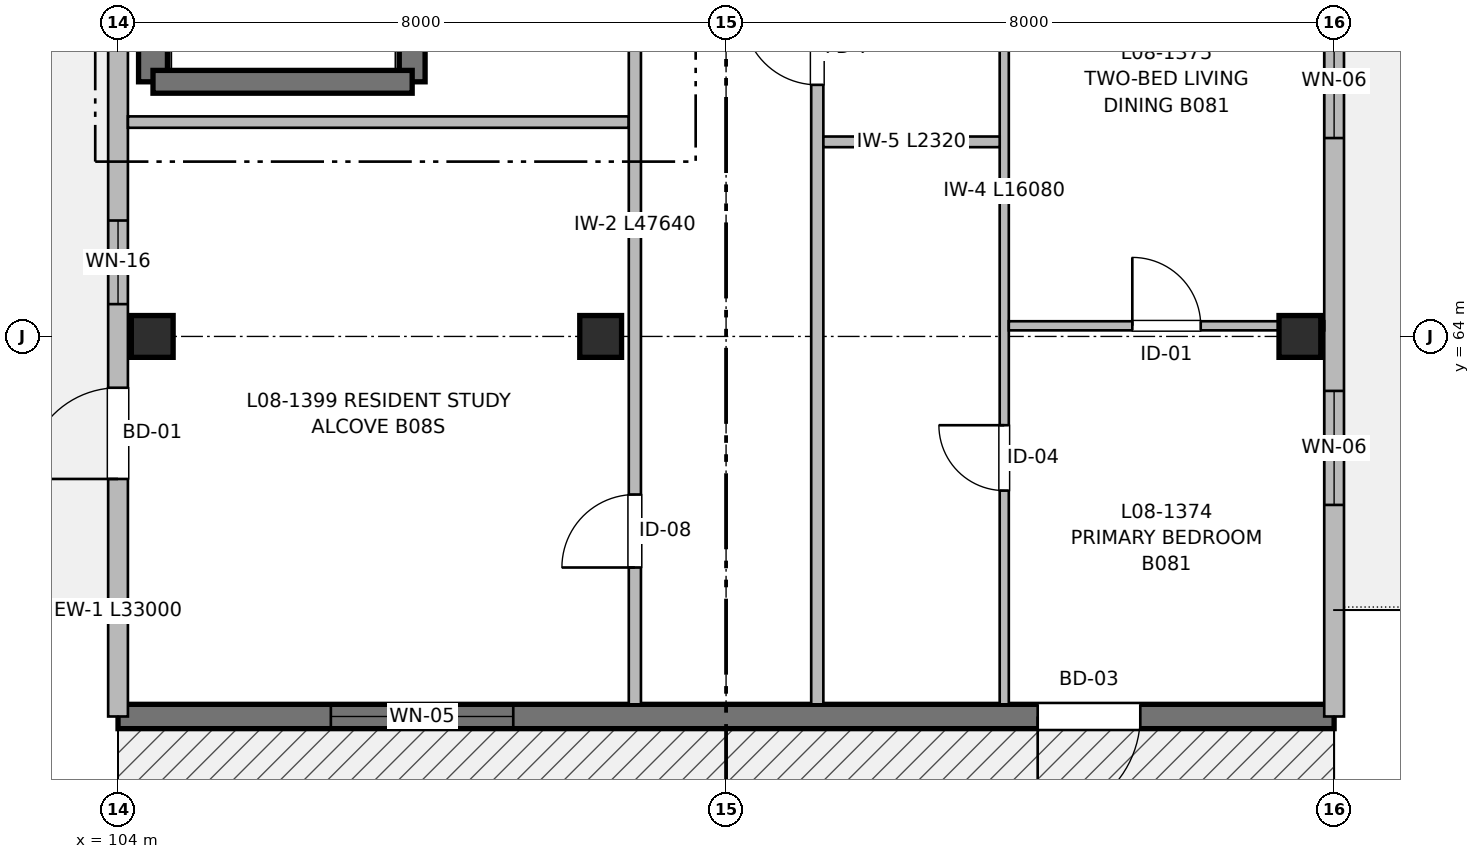
"""IFC4 building model, lengths in metres.
Left out: names, types, materials, properties, quantities, classifications, styles, units other than length and angle.
Written with IfcOpenShell. Run it as: python <this file> out.ifc"""

import sys

from ifc_helpers import new_model, si_unit, direction, frame, frame_2d, origin, origin_2d, place, context, subcontext, project, spatial, rectangle, extrude, element, fill, save


model = new_model("IFC4")
c1 = context("Model", 3, precision=1e-05, world=origin(), true_north=direction((0.0, 1.0)))
c2 = subcontext(c1, "Body", "Model", "MODEL_VIEW")
j1 = project(units=[si_unit("LENGTHUNIT", "METRE"), si_unit("PLANEANGLEUNIT", "RADIAN")], contexts=[c1])
p1 = place(None, origin())
s1 = spatial("IfcSite", under=j1, at=p1, CompositionType="ELEMENT")
p2 = place(p1, origin())
s2 = spatial("IfcBuilding", under=s1, at=p2, CompositionType="ELEMENT")
p3 = place(p2, frame((0.0, 0.0, 26.56)))
s3 = spatial("IfcBuildingStorey", under=s2, at=p3, CompositionType="ELEMENT", Elevation=26.56)
for number, where, z_axis, x_axis in (
    (1, (104.45, 64.0, 0.0), (0.0, 0.0, 1.0), (1.0, 0.0, 0.0)),
    (2, (110.35, 64.0, 0.0), (0.0, 0.0, 1.0), (1.0, 0.0, 0.0)),
    (3, (119.55, 64.0, 0.0), (0.0, 0.0, 1.0), (1.0, 0.0, 0.0)),
):
    element("IfcColumn", number, at=place(p3, frame(where, z_axis=z_axis, x_axis=x_axis)), inside=s3, PredefinedType="COLUMN", context=c2, shape_type="SweptSolid", body=[
        extrude(rectangle(XDim=0.55, YDim=0.55, at=origin_2d()), origin(), (0.0, 0.0, 1.0), 3.2),
    ])
p4 = place(p3, frame((104.46, 67.35, 0.0), z_axis=(0.0, 0.0, 1.0), x_axis=(0.0, 1.0, 0.0)))
e4 = element("IfcWall", 4, at=p4, inside=s3, PredefinedType="SHEAR", context=c2, shape_type="SweptSolid", body=[
    extrude(rectangle(XDim=12.45, YDim=0.38, at=frame_2d((6.225, 0.0))), origin(), (0.0, 0.0, 1.0), 3.2),
])
p5 = place(p4, frame((2.2, 0.0, 0.97)))
e5 = element("IfcOpeningElement", 5, at=p5, cuts=e4, PredefinedType="OPENING", context=c2, shape_type="SweptSolid", body=[
    extrude(rectangle(XDim=0.95, YDim=1.25, at=frame_2d((0.475, 0.625))), frame((0.0, 0.2, 0.0), z_axis=(0.0, -1.0, 0.0), x_axis=(1.0, 0.0, 0.0)), (0.0, 0.0, 1.0), 0.4),
])
p6 = place(p3, frame((107.87, 79.8, 0.0), z_axis=(0.0, 0.0, 1.0), x_axis=(0.0, -1.0, 0.0)))
e6 = element("IfcWall", 6, at=p6, inside=s3, PredefinedType="SHEAR", context=c2, shape_type="SweptSolid", body=[
    extrude(rectangle(XDim=12.45, YDim=0.34, at=frame_2d((6.225, 0.0))), origin(), (0.0, 0.0, 1.0), 3.2),
])
p7 = place(p6, frame((10.85, 0.0, 0.0)))
e7 = element("IfcOpeningElement", 7, at=p7, cuts=e6, PredefinedType="OPENING", context=c2, shape_type="SweptSolid", body=[
    extrude(rectangle(XDim=1.05, YDim=2.15, at=frame_2d((0.525, 1.075))), frame((0.0, 0.18, 0.0), z_axis=(0.0, -1.0, 0.0), x_axis=(1.0, 0.0, 0.0)), (0.0, 0.0, 1.0), 0.36),
])
p8 = place(p3, frame((107.87, 67.35, 0.0), z_axis=(0.0, 0.0, 1.0), x_axis=(-1.0, 0.0, 0.0)))
e8 = element("IfcWall", 8, at=p8, inside=s3, PredefinedType="SHEAR", context=c2, shape_type="SweptSolid", body=[
    extrude(rectangle(XDim=3.41, YDim=0.3, at=frame_2d((1.705, 0.0))), origin(), (0.0, 0.0, 1.0), 3.2),
])
p9 = place(p3, frame((120.0, 59.0, 0.0), z_axis=(0.0, 0.0, 1.0), x_axis=(-1.0, 0.0, 0.0)))
e9 = element("IfcWall", 9, at=p9, inside=s3, PredefinedType="SHEAR", context=c2, shape_type="SweptSolid", body=[
    extrude(rectangle(XDim=16.0, YDim=0.32, at=frame_2d((8.0, 0.0))), origin(), (0.0, 0.0, 1.0), 2.98),
])
p10 = place(p9, frame((2.55, 0.0, 0.0)))
e10 = element("IfcOpeningElement", 10, at=p10, cuts=e9, PredefinedType="OPENING", context=c2, shape_type="SweptSolid", body=[
    extrude(rectangle(XDim=1.35, YDim=2.2, at=frame_2d((0.675, 1.1))), frame((0.0, 0.17, 0.0), z_axis=(0.0, -1.0, 0.0), x_axis=(1.0, 0.0, 0.0)), (0.0, 0.0, 1.0), 0.34),
])
p11 = place(p9, frame((10.8, 0.0, 0.72)))
e11 = element("IfcOpeningElement", 11, at=p11, cuts=e9, PredefinedType="OPENING", context=c2, shape_type="SweptSolid", body=[
    extrude(rectangle(XDim=2.4, YDim=1.5, at=frame_2d((1.2, 0.75))), frame((0.0, 0.17, 0.0), z_axis=(0.0, -1.0, 0.0), x_axis=(1.0, 0.0, 0.0)), (0.0, 0.0, 1.0), 0.34),
])
p12 = place(p3, frame((120.0, 88.0, 0.0), z_axis=(0.0, 0.0, 1.0), x_axis=(0.0, -1.0, 0.0)))
e12 = element("IfcWall", 12, at=p12, inside=s3, PredefinedType="SOLIDWALL", context=c2, shape_type="SweptSolid", body=[
    extrude(rectangle(XDim=29.0, YDim=0.26, at=frame_2d((14.5, 0.0))), origin(), (0.0, 0.0, 1.0), 2.98),
])
p13 = place(p12, frame((4.233, 0.0, 0.0)))
e13 = element("IfcOpeningElement", 13, at=p13, cuts=e12, PredefinedType="OPENING", context=c2, shape_type="SweptSolid", body=[
    extrude(rectangle(XDim=1.2, YDim=2.2, at=frame_2d((0.6, 1.1))), frame((0.0, 0.14, 0.0), z_axis=(0.0, -1.0, 0.0), x_axis=(1.0, 0.0, 0.0)), (0.0, 0.0, 1.0), 0.28),
])
p14 = place(p12, frame((6.133, 0.0, 0.62)))
e14 = element("IfcOpeningElement", 14, at=p14, cuts=e12, PredefinedType="OPENING", context=c2, shape_type="SweptSolid", body=[
    extrude(rectangle(XDim=1.1, YDim=1.6, at=frame_2d((0.55, 0.8))), frame((0.0, 0.14, 0.0), z_axis=(0.0, -1.0, 0.0), x_axis=(1.0, 0.0, 0.0)), (0.0, 0.0, 1.0), 0.28),
])
p15 = place(p12, frame((13.3, 0.0, 0.72)))
e15 = element("IfcOpeningElement", 15, at=p15, cuts=e12, PredefinedType="OPENING", context=c2, shape_type="SweptSolid", body=[
    extrude(rectangle(XDim=2.4, YDim=1.5, at=frame_2d((1.2, 0.75))), frame((0.0, 0.14, 0.0), z_axis=(0.0, -1.0, 0.0), x_axis=(1.0, 0.0, 0.0)), (0.0, 0.0, 1.0), 0.28),
])
p16 = place(p12, frame((24.717, 0.0, 0.82)))
e16 = element("IfcOpeningElement", 16, at=p16, cuts=e12, PredefinedType="OPENING", context=c2, shape_type="SweptSolid", body=[
    extrude(rectangle(XDim=1.5, YDim=1.4, at=frame_2d((0.75, 0.7))), frame((0.0, 0.14, 0.0), z_axis=(0.0, -1.0, 0.0), x_axis=(1.0, 0.0, 0.0)), (0.0, 0.0, 1.0), 0.28),
])
p17 = place(p12, frame((19.89, 0.0, 0.82)))
e17 = element("IfcOpeningElement", 17, at=p17, cuts=e12, PredefinedType="OPENING", context=c2, shape_type="SweptSolid", body=[
    extrude(rectangle(XDim=1.5, YDim=1.4, at=frame_2d((0.75, 0.7))), frame((0.0, 0.14, 0.0), z_axis=(0.0, -1.0, 0.0), x_axis=(1.0, 0.0, 0.0)), (0.0, 0.0, 1.0), 0.28),
])
p18 = place(p12, frame((9.375, 0.0, 0.82)))
e18 = element("IfcOpeningElement", 18, at=p18, cuts=e12, PredefinedType="OPENING", context=c2, shape_type="SweptSolid", body=[
    extrude(rectangle(XDim=1.5, YDim=1.4, at=frame_2d((0.75, 0.7))), frame((0.0, 0.14, 0.0), z_axis=(0.0, -1.0, 0.0), x_axis=(1.0, 0.0, 0.0)), (0.0, 0.0, 1.0), 0.28),
])
p19 = place(p3, frame((104.0, 59.0, 0.0), z_axis=(0.0, 0.0, 1.0), x_axis=(0.0, 1.0, 0.0)))
e19 = element("IfcWall", 19, at=p19, inside=s3, PredefinedType="SOLIDWALL", context=c2, shape_type="SweptSolid", body=[
    extrude(rectangle(XDim=33.0, YDim=0.26, at=frame_2d((16.5, 0.0))), origin(), (0.0, 0.0, 1.0), 2.98),
])
p20 = place(p19, frame((3.125, 0.0, 0.0)))
e20 = element("IfcOpeningElement", 20, at=p20, cuts=e19, PredefinedType="OPENING", context=c2, shape_type="SweptSolid", body=[
    extrude(rectangle(XDim=1.2, YDim=2.2, at=frame_2d((0.6, 1.1))), frame((0.0, 0.14, 0.0), z_axis=(0.0, -1.0, 0.0), x_axis=(1.0, 0.0, 0.0)), (0.0, 0.0, 1.0), 0.28),
])
p21 = place(p19, frame((5.425, 0.0, 0.62)))
e21 = element("IfcOpeningElement", 21, at=p21, cuts=e19, PredefinedType="OPENING", context=c2, shape_type="SweptSolid", body=[
    extrude(rectangle(XDim=1.1, YDim=1.6, at=frame_2d((0.55, 0.8))), frame((0.0, 0.14, 0.0), z_axis=(0.0, -1.0, 0.0), x_axis=(1.0, 0.0, 0.0)), (0.0, 0.0, 1.0), 0.28),
])
p22 = place(p19, frame((11.175, 0.0, 0.72)))
e22 = element("IfcOpeningElement", 22, at=p22, cuts=e19, PredefinedType="OPENING", context=c2, shape_type="SweptSolid", body=[
    extrude(rectangle(XDim=2.4, YDim=1.5, at=frame_2d((1.2, 0.75))), frame((0.0, 0.14, 0.0), z_axis=(0.0, -1.0, 0.0), x_axis=(1.0, 0.0, 0.0)), (0.0, 0.0, 1.0), 0.28),
])
p23 = place(p19, frame((19.025, 0.0, 0.82)))
e23 = element("IfcOpeningElement", 23, at=p23, cuts=e19, PredefinedType="OPENING", context=c2, shape_type="SweptSolid", body=[
    extrude(rectangle(XDim=1.5, YDim=1.4, at=frame_2d((0.75, 0.7))), frame((0.0, 0.14, 0.0), z_axis=(0.0, -1.0, 0.0), x_axis=(1.0, 0.0, 0.0)), (0.0, 0.0, 1.0), 0.28),
])
p24 = place(p19, frame((28.1, 0.0, 0.82)))
e24 = element("IfcOpeningElement", 24, at=p24, cuts=e19, PredefinedType="OPENING", context=c2, shape_type="SweptSolid", body=[
    extrude(rectangle(XDim=1.55, YDim=1.4, at=frame_2d((0.775, 0.7))), frame((0.0, 0.14, 0.0), z_axis=(0.0, -1.0, 0.0), x_axis=(1.0, 0.0, 0.0)), (0.0, 0.0, 1.0), 0.28),
])
p25 = place(p3, frame((104.13, 66.82, 0.0), z_axis=(0.0, 0.0, 1.0), x_axis=(1.0, 0.0, 0.0)))
e25 = element("IfcWall", 25, at=p25, inside=s3, PredefinedType="PARTITIONING", context=c2, shape_type="SweptSolid", body=[
    extrude(rectangle(XDim=6.59, YDim=0.15, at=frame_2d((3.295, 0.0))), origin(), (0.0, 0.0, 1.0), 2.935),
])
p26 = place(p3, frame((110.8, 59.16, 0.0), z_axis=(0.0, 0.0, 1.0), x_axis=(0.0, 1.0, 0.0)))
e26 = element("IfcWall", 26, at=p26, inside=s3, PredefinedType="PARTITIONING", context=c2, shape_type="SweptSolid", body=[
    extrude(rectangle(XDim=47.64, YDim=0.16, at=frame_2d((23.82, 0.0))), origin(), (0.0, 0.0, 1.0), 2.935),
])
p27 = place(p26, frame((9.84, 0.0, 0.0)))
e27 = element("IfcOpeningElement", 27, at=p27, cuts=e26, PredefinedType="OPENING", context=c2, shape_type="SweptSolid", body=[
    extrude(rectangle(XDim=1.1, YDim=2.15, at=frame_2d((0.55, 1.075))), frame((0.0, 0.09, 0.0), z_axis=(0.0, -1.0, 0.0), x_axis=(1.0, 0.0, 0.0)), (0.0, 0.0, 1.0), 0.18),
])
p28 = place(p26, frame((16.24, 0.0, 0.0)))
e28 = element("IfcOpeningElement", 28, at=p28, cuts=e26, PredefinedType="OPENING", context=c2, shape_type="SweptSolid", body=[
    extrude(rectangle(XDim=1.6, YDim=2.15, at=frame_2d((0.8, 1.075))), frame((0.0, 0.09, 0.0), z_axis=(0.0, -1.0, 0.0), x_axis=(1.0, 0.0, 0.0)), (0.0, 0.0, 1.0), 0.18),
])
p29 = place(p26, frame((1.8, 0.0, 0.0)))
e29 = element("IfcOpeningElement", 29, at=p29, cuts=e26, PredefinedType="OPENING", context=c2, shape_type="SweptSolid", body=[
    extrude(rectangle(XDim=0.96, YDim=2.15, at=frame_2d((0.48, 1.075))), frame((0.0, 0.09, 0.0), z_axis=(0.0, -1.0, 0.0), x_axis=(1.0, 0.0, 0.0)), (0.0, 0.0, 1.0), 0.18),
])
p30 = place(p26, frame((29.645, 0.0, 0.0)))
e30 = element("IfcOpeningElement", 30, at=p30, cuts=e26, PredefinedType="OPENING", context=c2, shape_type="SweptSolid", body=[
    extrude(rectangle(XDim=0.98, YDim=2.15, at=frame_2d((0.49, 1.075))), frame((0.0, 0.09, 0.0), z_axis=(0.0, -1.0, 0.0), x_axis=(1.0, 0.0, 0.0)), (0.0, 0.0, 1.0), 0.18),
])
p31 = place(p26, frame((38.255, 0.0, 0.0)))
e31 = element("IfcOpeningElement", 31, at=p31, cuts=e26, PredefinedType="OPENING", context=c2, shape_type="SweptSolid", body=[
    extrude(rectangle(XDim=0.98, YDim=2.15, at=frame_2d((0.49, 1.075))), frame((0.0, 0.09, 0.0), z_axis=(0.0, -1.0, 0.0), x_axis=(1.0, 0.0, 0.0)), (0.0, 0.0, 1.0), 0.18),
])
p32 = place(p3, frame((113.2, 59.16, 0.0), z_axis=(0.0, 0.0, 1.0), x_axis=(0.0, 1.0, 0.0)))
e32 = element("IfcWall", 32, at=p32, inside=s3, PredefinedType="PARTITIONING", context=c2, shape_type="SweptSolid", body=[
    extrude(rectangle(XDim=47.64, YDim=0.16, at=frame_2d((23.82, 0.0))), origin(), (0.0, 0.0, 1.0), 2.935),
])
p33 = place(p32, frame((8.15, 0.0, 0.0)))
e33 = element("IfcOpeningElement", 33, at=p33, cuts=e32, PredefinedType="OPENING", context=c2, shape_type="SweptSolid", body=[
    extrude(rectangle(XDim=0.98, YDim=2.15, at=frame_2d((0.49, 1.075))), frame((0.0, 0.09, 0.0), z_axis=(0.0, -1.0, 0.0), x_axis=(1.0, 0.0, 0.0)), (0.0, 0.0, 1.0), 0.18),
])
p34 = place(p32, frame((24.37, 0.0, 0.0)))
e34 = element("IfcOpeningElement", 34, at=p34, cuts=e32, PredefinedType="OPENING", context=c2, shape_type="SweptSolid", body=[
    extrude(rectangle(XDim=0.98, YDim=2.15, at=frame_2d((0.49, 1.075))), frame((0.0, 0.09, 0.0), z_axis=(0.0, -1.0, 0.0), x_axis=(1.0, 0.0, 0.0)), (0.0, 0.0, 1.0), 0.18),
])
p35 = place(p32, frame((40.14, 0.0, 0.0)))
e35 = element("IfcOpeningElement", 35, at=p35, cuts=e32, PredefinedType="OPENING", context=c2, shape_type="SweptSolid", body=[
    extrude(rectangle(XDim=0.98, YDim=2.15, at=frame_2d((0.49, 1.075))), frame((0.0, 0.09, 0.0), z_axis=(0.0, -1.0, 0.0), x_axis=(1.0, 0.0, 0.0)), (0.0, 0.0, 1.0), 0.18),
])
p36 = place(p3, frame((115.66, 59.16, 0.0), z_axis=(0.0, 0.0, 1.0), x_axis=(0.0, 1.0, 0.0)))
e36 = element("IfcWall", 36, at=p36, inside=s3, PredefinedType="PARTITIONING", context=c2, shape_type="SweptSolid", body=[
    extrude(rectangle(XDim=16.08, YDim=0.12, at=frame_2d((8.04, 0.0))), origin(), (0.0, 0.0, 1.0), 2.935),
])
p37 = place(p36, frame((2.812, 0.0, 0.0)))
e37 = element("IfcOpeningElement", 37, at=p37, cuts=e36, PredefinedType="OPENING", context=c2, shape_type="SweptSolid", body=[
    extrude(rectangle(XDim=0.86, YDim=2.1, at=frame_2d((0.43, 1.05))), frame((0.0, 0.07, 0.0), z_axis=(0.0, -1.0, 0.0), x_axis=(1.0, 0.0, 0.0)), (0.0, 0.0, 1.0), 0.14),
])
p38 = place(p36, frame((9.83, 0.0, 0.0)))
e38 = element("IfcOpeningElement", 38, at=p38, cuts=e36, PredefinedType="OPENING", context=c2, shape_type="SweptSolid", body=[
    extrude(rectangle(XDim=0.92, YDim=2.1, at=frame_2d((0.46, 1.05))), frame((0.0, 0.07, 0.0), z_axis=(0.0, -1.0, 0.0), x_axis=(1.0, 0.0, 0.0)), (0.0, 0.0, 1.0), 0.14),
])
p39 = place(p3, frame((113.28, 66.56, 0.0), z_axis=(0.0, 0.0, 1.0), x_axis=(1.0, 0.0, 0.0)))
e39 = element("IfcWall", 39, at=p39, inside=s3, PredefinedType="PARTITIONING", context=c2, shape_type="SweptSolid", body=[
    extrude(rectangle(XDim=2.32, YDim=0.14, at=frame_2d((1.16, 0.0))), origin(), (0.0, 0.0, 1.0), 2.935),
])
p40 = place(p3, frame((115.72, 64.14, 0.0), z_axis=(0.0, 0.0, 1.0), x_axis=(1.0, 0.0, 0.0)))
e40 = element("IfcWall", 40, at=p40, inside=s3, PredefinedType="PARTITIONING", context=c2, shape_type="SweptSolid", body=[
    extrude(rectangle(XDim=4.15, YDim=0.12, at=frame_2d((2.075, 0.0))), origin(), (0.0, 0.0, 1.0), 2.53),
])
p41 = place(p40, frame((1.625, 0.0, 0.0)))
e41 = element("IfcOpeningElement", 41, at=p41, cuts=e40, PredefinedType="OPENING", context=c2, shape_type="SweptSolid", body=[
    extrude(rectangle(XDim=0.9, YDim=2.1, at=frame_2d((0.45, 1.05))), frame((0.0, 0.07, 0.0), z_axis=(0.0, -1.0, 0.0), x_axis=(1.0, 0.0, 0.0)), (0.0, 0.0, 1.0), 0.14),
])
p42 = place(p10, origin())
e42 = element("IfcDoor", 42, at=p42, inside=s3, OperationType="SINGLE_SWING_RIGHT", PredefinedType="DOOR", context=c2, shape_type="SweptSolid", body=[
    extrude(rectangle(XDim=1.35, YDim=2.2, at=frame_2d((0.675, 1.1))), frame((0.0, 0.025, 0.0), z_axis=(0.0, -1.0, 0.0), x_axis=(1.0, 0.0, 0.0)), (0.0, 0.0, 1.0), 0.05),
])
fill(e10, e42)
p43 = place(p11, origin())
e43 = element("IfcWindow", 43, at=p43, inside=s3, PartitioningType="SINGLE_PANEL", PredefinedType="WINDOW", context=c2, shape_type="SweptSolid", body=[
    extrude(rectangle(XDim=2.4, YDim=1.5, at=frame_2d((1.2, 0.75))), frame((0.0, 0.03, 0.0), z_axis=(0.0, -1.0, 0.0), x_axis=(1.0, 0.0, 0.0)), (0.0, 0.0, 1.0), 0.06),
])
fill(e11, e43)
p44 = place(p16, origin())
e44 = element("IfcWindow", 44, at=p44, inside=s3, PartitioningType="SINGLE_PANEL", PredefinedType="WINDOW", context=c2, shape_type="SweptSolid", body=[
    extrude(rectangle(XDim=1.5, YDim=1.4, at=frame_2d((0.75, 0.7))), frame((0.0, 0.03, 0.0), z_axis=(0.0, -1.0, 0.0), x_axis=(1.0, 0.0, 0.0)), (0.0, 0.0, 1.0), 0.06),
])
fill(e16, e44)
p45 = place(p20, origin())
e45 = element("IfcDoor", 45, at=p45, inside=s3, OperationType="SINGLE_SWING_LEFT", PredefinedType="DOOR", context=c2, shape_type="SweptSolid", body=[
    extrude(rectangle(XDim=1.2, YDim=2.2, at=frame_2d((0.6, 1.1))), frame((0.0, 0.025, 0.0), z_axis=(0.0, -1.0, 0.0), x_axis=(1.0, 0.0, 0.0)), (0.0, 0.0, 1.0), 0.05),
])
fill(e20, e45)
p46 = place(p21, origin())
e46 = element("IfcWindow", 46, at=p46, inside=s3, PartitioningType="SINGLE_PANEL", PredefinedType="WINDOW", context=c2, shape_type="SweptSolid", body=[
    extrude(rectangle(XDim=1.1, YDim=1.6, at=frame_2d((0.55, 0.8))), frame((0.0, 0.03, 0.0), z_axis=(0.0, -1.0, 0.0), x_axis=(1.0, 0.0, 0.0)), (0.0, 0.0, 1.0), 0.06),
])
fill(e21, e46)
p47 = place(p37, origin())
e47 = element("IfcDoor", 47, at=p47, inside=s3, OperationType="SINGLE_SWING_RIGHT", PredefinedType="DOOR", context=c2, shape_type="SweptSolid", body=[
    extrude(rectangle(XDim=0.86, YDim=2.1, at=frame_2d((0.43, 1.05))), frame((0.0, 0.025, 0.0), z_axis=(0.0, -1.0, 0.0), x_axis=(1.0, 0.0, 0.0)), (0.0, 0.0, 1.0), 0.05),
])
fill(e37, e47)
p48 = place(p33, origin())
e48 = element("IfcDoor", 48, at=p48, inside=s3, OperationType="SINGLE_SWING_RIGHT", PredefinedType="DOOR", context=c2, shape_type="SweptSolid", body=[
    extrude(rectangle(XDim=0.98, YDim=2.15, at=frame_2d((0.49, 1.075))), frame((0.0, 0.025, 0.0), z_axis=(0.0, -1.0, 0.0), x_axis=(1.0, 0.0, 0.0)), (0.0, 0.0, 1.0), 0.05),
])
fill(e33, e48)
p49 = place(p41, origin())
e49 = element("IfcDoor", 49, at=p49, inside=s3, OperationType="SINGLE_SWING_LEFT", PredefinedType="DOOR", context=c2, shape_type="SweptSolid", body=[
    extrude(rectangle(XDim=0.9, YDim=2.1, at=frame_2d((0.45, 1.05))), frame((0.0, 0.025, 0.0), z_axis=(0.0, -1.0, 0.0), x_axis=(1.0, 0.0, 0.0)), (0.0, 0.0, 1.0), 0.05),
])
fill(e41, e49)
p50 = place(p29, origin())
e50 = element("IfcDoor", 50, at=p50, inside=s3, OperationType="SINGLE_SWING_LEFT", PredefinedType="DOOR", context=c2, shape_type="SweptSolid", body=[
    extrude(rectangle(XDim=0.96, YDim=2.15, at=frame_2d((0.48, 1.075))), frame((0.0, 0.025, 0.0), z_axis=(0.0, -1.0, 0.0), x_axis=(1.0, 0.0, 0.0)), (0.0, 0.0, 1.0), 0.05),
])
fill(e29, e50)
p51 = place(p17, origin())
e51 = element("IfcWindow", 51, at=p51, inside=s3, PartitioningType="SINGLE_PANEL", PredefinedType="WINDOW", context=c2, shape_type="SweptSolid", body=[
    extrude(rectangle(XDim=1.5, YDim=1.4, at=frame_2d((0.75, 0.7))), frame((0.0, 0.03, 0.0), z_axis=(0.0, -1.0, 0.0), x_axis=(1.0, 0.0, 0.0)), (0.0, 0.0, 1.0), 0.06),
])
fill(e17, e51)
save(model, sys.argv[1])
